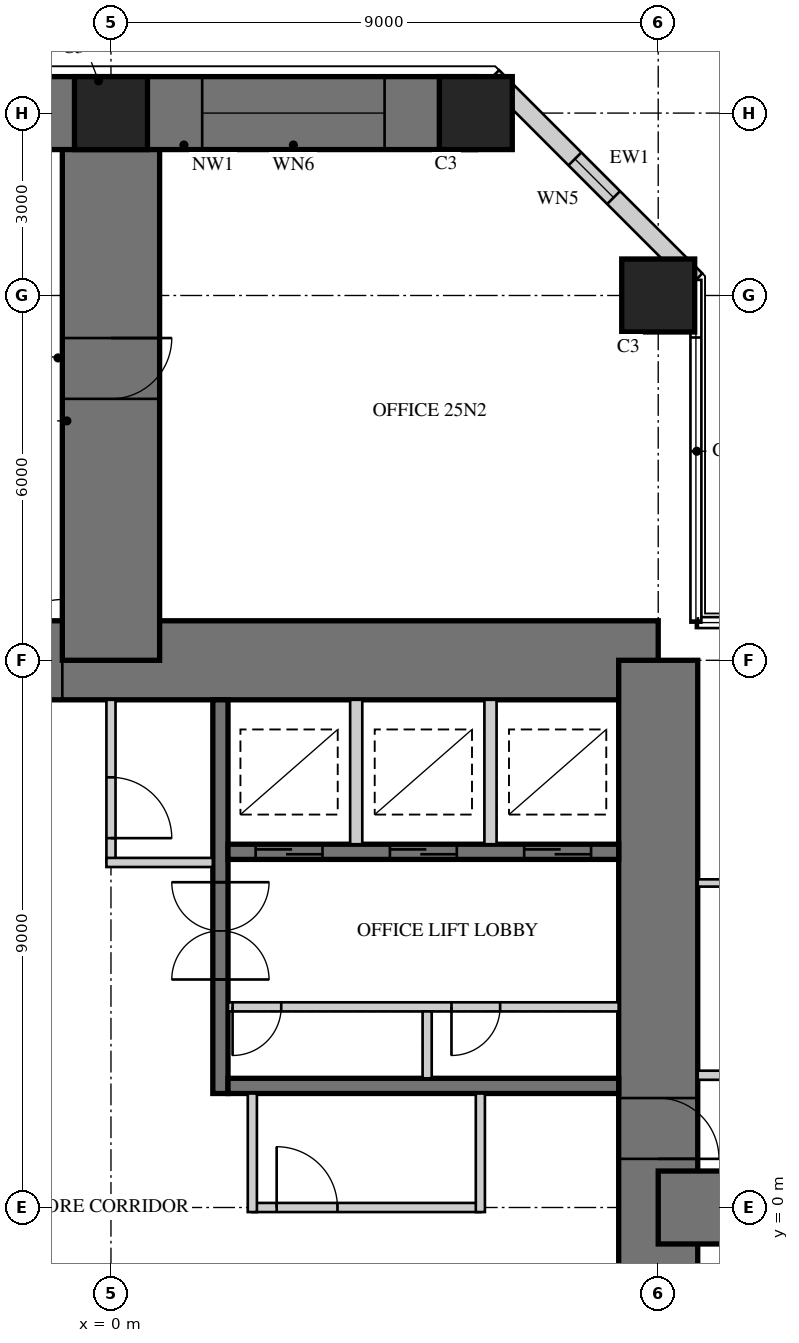
"""IFC4 building model, lengths in metres.
Left out: names, types, materials, properties, quantities, classifications, styles, units other than length and angle.
Written with IfcOpenShell. Run it as: python <this file> out.ifc"""

import sys

from ifc_helpers import new_model, si_unit, direction, frame, frame_2d, origin, origin_2d, place, context, subcontext, project, spatial, rectangle, hollow_rectangle, extrude, element, fill, save


model = new_model("IFC4")
c1 = context("Model", 3, precision=1e-05, world=origin(), true_north=direction((0.0, 1.0)))
c2 = subcontext(c1, "Body", "Model", "MODEL_VIEW")
j1 = project(units=[si_unit("LENGTHUNIT", "METRE"), si_unit("PLANEANGLEUNIT", "RADIAN")], contexts=[c1])
p1 = place(None, origin())
s1 = spatial("IfcSite", under=j1, at=p1, CompositionType="ELEMENT")
p2 = place(p1, origin())
s2 = spatial("IfcBuilding", under=s1, at=p2, CompositionType="ELEMENT")
p3 = place(p2, frame((0.0, 0.0, 104.5)))
s3 = spatial("IfcBuildingStorey", under=s2, at=p3, CompositionType="ELEMENT", Elevation=104.5)
p4 = place(p3, frame((9.0, 9.0, 0.0), z_axis=(0.0, 0.0, 1.0), x_axis=(-1.0, 0.0, 0.0)))
e1 = element("IfcWall", 1, at=p4, inside=s3, PredefinedType="SHEAR", context=c2, shape_type="SweptSolid", body=[
    extrude(rectangle(XDim=18.0, YDim=1.3, at=frame_2d((9.0, 0.0))), origin(), (0.0, 0.0, 1.0), 4.0),
])
p5 = place(p4, frame((9.8, 0.0, 0.0)))
e2 = element("IfcOpeningElement", 2, at=p5, cuts=e1, PredefinedType="OPENING", context=c2, shape_type="SweptSolid", body=[
    extrude(rectangle(XDim=1.0, YDim=2.4, at=frame_2d((0.5, 1.2))), frame((0.0, 0.66, 0.0), z_axis=(0.0, -1.0, 0.0), x_axis=(1.0, 0.0, 0.0)), (0.0, 0.0, 1.0), 1.32),
])
p6 = place(p3, frame((9.0, -9.0, 0.0), z_axis=(0.0, 0.0, 1.0), x_axis=(0.0, 1.0, 0.0)))
e3 = element("IfcWall", 3, at=p6, inside=s3, PredefinedType="SHEAR", context=c2, shape_type="SweptSolid", body=[
    extrude(rectangle(XDim=18.0, YDim=1.3, at=frame_2d((9.0, 0.0))), origin(), (0.0, 0.0, 1.0), 4.0),
])
p7 = place(p6, frame((9.8, 0.0, 0.0)))
e4 = element("IfcOpeningElement", 4, at=p7, cuts=e3, PredefinedType="OPENING", context=c2, shape_type="SweptSolid", body=[
    extrude(rectangle(XDim=1.0, YDim=2.4, at=frame_2d((0.5, 1.2))), frame((0.0, 0.66, 0.0), z_axis=(0.0, -1.0, 0.0), x_axis=(1.0, 0.0, 0.0)), (0.0, 0.0, 1.0), 1.32),
])
p8 = place(p3, frame((1.8, 1.875, 0.0), z_axis=(0.0, 0.0, 1.0), x_axis=(0.0, 1.0, 0.0)))
e5 = element("IfcWall", 5, at=p8, inside=s3, PredefinedType="SHEAR", context=c2, shape_type="SweptSolid", body=[
    extrude(rectangle(XDim=6.475, YDim=0.25, at=frame_2d((3.238, 0.0))), origin(), (0.0, 0.0, 1.0), 4.0),
])
p9 = place(p8, frame((1.875, 0.0, 0.0)))
e6 = element("IfcOpeningElement", 6, at=p9, cuts=e5, PredefinedType="OPENING", context=c2, shape_type="SweptSolid", body=[
    extrude(rectangle(XDim=1.6, YDim=2.4, at=frame_2d((0.8, 1.2))), frame((0.0, 0.135, 0.0), z_axis=(0.0, -1.0, 0.0), x_axis=(1.0, 0.0, 0.0)), (0.0, 0.0, 1.0), 0.27),
])
p10 = place(p3, frame((1.925, 2.0, 0.0), z_axis=(0.0, 0.0, 1.0), x_axis=(1.0, 0.0, 0.0)))
e7 = element("IfcWall", 7, at=p10, inside=s3, PredefinedType="SHEAR", context=c2, shape_type="SweptSolid", body=[
    extrude(rectangle(XDim=6.425, YDim=0.25, at=frame_2d((3.212, 0.0))), origin(), (0.0, 0.0, 1.0), 4.0),
])
p11 = place(p3, frame((1.925, 5.85, 0.0), z_axis=(0.0, 0.0, 1.0), x_axis=(1.0, 0.0, 0.0)))
e8 = element("IfcWall", 8, at=p11, inside=s3, PredefinedType="SHEAR", context=c2, shape_type="SweptSolid", body=[
    extrude(rectangle(XDim=6.425, YDim=0.25, at=frame_2d((3.212, 0.0))), origin(), (0.0, 0.0, 1.0), 4.0),
])
p12 = place(p11, frame((0.454, 0.0, 0.0)))
e9 = element("IfcOpeningElement", 9, at=p12, cuts=e8, PredefinedType="OPENING", context=c2, shape_type="SweptSolid", body=[
    extrude(rectangle(XDim=1.1, YDim=2.2, at=frame_2d((0.55, 1.1))), frame((0.0, 0.135, 0.0), z_axis=(0.0, -1.0, 0.0), x_axis=(1.0, 0.0, 0.0)), (0.0, 0.0, 1.0), 0.27),
])
p13 = place(p11, frame((2.663, 0.0, 0.0)))
e10 = element("IfcOpeningElement", 10, at=p13, cuts=e8, PredefinedType="OPENING", context=c2, shape_type="SweptSolid", body=[
    extrude(rectangle(XDim=1.1, YDim=2.2, at=frame_2d((0.55, 1.1))), frame((0.0, 0.135, 0.0), z_axis=(0.0, -1.0, 0.0), x_axis=(1.0, 0.0, 0.0)), (0.0, 0.0, 1.0), 0.27),
])
p14 = place(p11, frame((4.871, 0.0, 0.0)))
e11 = element("IfcOpeningElement", 11, at=p14, cuts=e8, PredefinedType="OPENING", context=c2, shape_type="SweptSolid", body=[
    extrude(rectangle(XDim=1.1, YDim=2.2, at=frame_2d((0.55, 1.1))), frame((0.0, 0.135, 0.0), z_axis=(0.0, -1.0, 0.0), x_axis=(1.0, 0.0, 0.0)), (0.0, 0.0, 1.0), 0.27),
])
p15 = place(p3, frame((1.925, 3.3, 0.0), z_axis=(0.0, 0.0, 1.0), x_axis=(1.0, 0.0, 0.0)))
e12 = element("IfcWall", 12, at=p15, inside=s3, PredefinedType="PARTITIONING", context=c2, shape_type="SweptSolid", body=[
    extrude(rectangle(XDim=6.425, YDim=0.15, at=frame_2d((3.212, 0.0))), origin(), (0.0, 0.0, 1.0), 4.0),
])
p16 = place(p15, frame((0.075, 0.0, 0.0)))
e13 = element("IfcOpeningElement", 13, at=p16, cuts=e12, PredefinedType="OPENING", context=c2, shape_type="SweptSolid", body=[
    extrude(rectangle(XDim=0.8, YDim=2.1, at=frame_2d((0.4, 1.05))), frame((0.0, 0.085, 0.0), z_axis=(0.0, -1.0, 0.0), x_axis=(1.0, 0.0, 0.0)), (0.0, 0.0, 1.0), 0.17),
])
p17 = place(p15, frame((3.675, 0.0, 0.0)))
e14 = element("IfcOpeningElement", 14, at=p17, cuts=e12, PredefinedType="OPENING", context=c2, shape_type="SweptSolid", body=[
    extrude(rectangle(XDim=0.8, YDim=2.1, at=frame_2d((0.4, 1.05))), frame((0.0, 0.085, 0.0), z_axis=(0.0, -1.0, 0.0), x_axis=(1.0, 0.0, 0.0)), (0.0, 0.0, 1.0), 0.17),
])
p18 = place(p3, frame((5.2, 2.125, 0.0), z_axis=(0.0, 0.0, 1.0), x_axis=(0.0, 1.0, 0.0)))
e15 = element("IfcWall", 15, at=p18, inside=s3, PredefinedType="PARTITIONING", context=c2, shape_type="SweptSolid", body=[
    extrude(rectangle(XDim=1.1, YDim=0.15, at=frame_2d((0.55, 0.0))), origin(), (0.0, 0.0, 1.0), 4.0),
])
for number, where, z_axis, x_axis in (
    (16, (4.033, 5.975, 0.0), (0.0, 0.0, 1.0), (0.0, 1.0, 0.0)),
    (17, (6.242, 5.975, 0.0), (0.0, 0.0, 1.0), (0.0, 1.0, 0.0)),
):
    element("IfcWall", number, at=place(p3, frame(where, z_axis=z_axis, x_axis=x_axis)), inside=s3, PredefinedType="PARTITIONING", context=c2, shape_type="SweptSolid", body=[
        extrude(rectangle(XDim=2.375, YDim=0.2, at=frame_2d((1.188, 0.0))), origin(), (0.0, 0.0, 1.0), 4.0),
    ])
p19 = place(p3, frame((0.0, 9.0, 0.0), z_axis=(0.0, 0.0, 1.0), x_axis=(0.0, 1.0, 0.0)))
e18 = element("IfcWall", 18, at=p19, inside=s3, PredefinedType="SHEAR", context=c2, shape_type="SweptSolid", body=[
    extrude(rectangle(XDim=9.0, YDim=1.6, at=frame_2d((4.5, 0.0))), origin(), (0.0, 0.0, 1.0), 4.0),
])
p20 = place(p19, frame((4.3, 0.0, 0.0)))
e19 = element("IfcOpeningElement", 19, at=p20, cuts=e18, PredefinedType="OPENING", context=c2, shape_type="SweptSolid", body=[
    extrude(rectangle(XDim=1.0, YDim=2.2, at=frame_2d((0.5, 1.1))), frame((0.0, 0.81, 0.0), z_axis=(0.0, -1.0, 0.0), x_axis=(1.0, 0.0, 0.0)), (0.0, 0.0, 1.0), 1.62),
])
p21 = place(p3, frame((6.0, 18.0, 0.0), z_axis=(0.0, 0.0, 1.0), x_axis=(-1.0, 0.0, 0.0)))
e20 = element("IfcWall", 20, at=p21, inside=s3, PredefinedType="SHEAR", context=c2, shape_type="SweptSolid", body=[
    extrude(rectangle(XDim=12.0, YDim=1.2, at=frame_2d((6.0, 0.0))), origin(), (0.0, 0.0, 1.0), 4.0),
])
p22 = place(p21, frame((1.5, 0.0, 0.6)))
e21 = element("IfcOpeningElement", 21, at=p22, cuts=e20, PredefinedType="OPENING", context=c2, shape_type="SweptSolid", body=[
    extrude(rectangle(XDim=3.0, YDim=2.4, at=frame_2d((1.5, 1.2))), frame((0.0, 0.61, 0.0), z_axis=(0.0, -1.0, 0.0), x_axis=(1.0, 0.0, 0.0)), (0.0, 0.0, 1.0), 1.22),
])
p23 = place(p21, frame((7.5, 0.0, 0.6)))
e22 = element("IfcOpeningElement", 22, at=p23, cuts=e20, PredefinedType="OPENING", context=c2, shape_type="SweptSolid", body=[
    extrude(rectangle(XDim=3.0, YDim=2.4, at=frame_2d((1.5, 1.2))), frame((0.0, 0.61, 0.0), z_axis=(0.0, -1.0, 0.0), x_axis=(1.0, 0.0, 0.0)), (0.0, 0.0, 1.0), 1.22),
])
p24 = place(p3, frame((9.0, 0.0, 0.0), z_axis=(0.0, 0.0, 1.0), x_axis=(1.0, 0.0, 0.0)))
e23 = element("IfcWall", 23, at=p24, inside=s3, PredefinedType="SHEAR", context=c2, shape_type="SweptSolid", body=[
    extrude(rectangle(XDim=18.0, YDim=1.2, at=frame_2d((9.0, 0.0))), origin(), (0.0, 0.0, 1.0), 4.0),
])
p25 = place(p24, frame((9.8, 0.0, 0.0)))
e24 = element("IfcOpeningElement", 24, at=p25, cuts=e23, PredefinedType="OPENING", context=c2, shape_type="SweptSolid", body=[
    extrude(rectangle(XDim=1.0, YDim=2.2, at=frame_2d((0.5, 1.1))), frame((0.0, 0.61, 0.0), z_axis=(0.0, -1.0, 0.0), x_axis=(1.0, 0.0, 0.0)), (0.0, 0.0, 1.0), 1.22),
])
for number, where, z_axis, x_axis in (
    (25, (9.0, 15.0, 0.0), (0.0, 0.0, 1.0), (1.0, 0.0, 0.0)),
    (26, (6.0, 18.0, 0.0), (0.0, 0.0, 1.0), (1.0, 0.0, 0.0)),
    (27, (0.0, 18.0, 0.0), (0.0, 0.0, 1.0), (1.0, 0.0, 0.0)),
):
    element("IfcColumn", number, at=place(p3, frame(where, z_axis=z_axis, x_axis=x_axis)), inside=s3, PredefinedType="COLUMN", context=c2, shape_type="SweptSolid", body=[
        extrude(rectangle(XDim=1.2, YDim=1.2, at=origin_2d()), origin(), (0.0, 0.0, 1.0), 4.0),
    ])
p26 = place(p3, frame((9.62, 15.257, 0.0), z_axis=(0.0, 0.0, 1.0), x_axis=(-0.707106781187, 0.707106781187, 0.0)))
e28 = element("IfcWall", 28, at=p26, inside=s3, PredefinedType="SOLIDWALL", context=c2, shape_type="SweptSolid", body=[
    extrude(rectangle(XDim=4.728, YDim=0.3, at=frame_2d((2.364, 0.0))), origin(), (0.0, 0.0, 1.0), 3.8),
])
p27 = place(p26, frame((1.914, 0.0, 0.3)))
e29 = element("IfcOpeningElement", 29, at=p27, cuts=e28, PredefinedType="OPENING", context=c2, shape_type="SweptSolid", body=[
    extrude(rectangle(XDim=0.9, YDim=2.4, at=frame_2d((0.45, 1.2))), frame((0.0, 0.16, 0.0), z_axis=(0.0, -1.0, 0.0), x_axis=(1.0, 0.0, 0.0)), (0.0, 0.0, 1.0), 0.32),
])
p28 = place(p3, frame((2.325, 0.0, 0.0), z_axis=(0.0, 0.0, 1.0), x_axis=(1.0, 0.0, 0.0)))
e30 = element("IfcWall", 30, at=p28, inside=s3, PredefinedType="PARTITIONING", context=c2, shape_type="SweptSolid", body=[
    extrude(rectangle(XDim=3.75, YDim=0.15, at=frame_2d((1.875, 0.0))), origin(), (0.0, 0.0, 1.0), 3.8),
])
p29 = place(p28, frame((0.4, 0.0, 0.0)))
e31 = element("IfcOpeningElement", 31, at=p29, cuts=e30, PredefinedType="OPENING", context=c2, shape_type="SweptSolid", body=[
    extrude(rectangle(XDim=1.0, YDim=2.1, at=frame_2d((0.5, 1.05))), frame((0.0, 0.085, 0.0), z_axis=(0.0, -1.0, 0.0), x_axis=(1.0, 0.0, 0.0)), (0.0, 0.0, 1.0), 0.17),
])
for number, where, z_axis, x_axis in (
    (32, (2.325, 1.875, 0.0), (0.0, 0.0, 1.0), (0.0, -1.0, 0.0)),
    (33, (6.075, -0.075, 0.0), (0.0, 0.0, 1.0), (0.0, 1.0, 0.0)),
):
    element("IfcWall", number, at=place(p3, frame(where, z_axis=z_axis, x_axis=x_axis)), inside=s3, PredefinedType="PARTITIONING", context=c2, shape_type="SweptSolid", body=[
        extrude(rectangle(XDim=1.95, YDim=0.15, at=frame_2d((0.975, 0.0))), origin(), (0.0, 0.0, 1.0), 3.8),
    ])
p30 = place(p3, frame((0.0, 5.675, 0.0), z_axis=(0.0, 0.0, 1.0), x_axis=(0.0, 1.0, 0.0)))
e34 = element("IfcWall", 34, at=p30, inside=s3, PredefinedType="PARTITIONING", context=c2, shape_type="SweptSolid", body=[
    extrude(rectangle(XDim=2.675, YDim=0.15, at=frame_2d((1.337, 0.0))), origin(), (0.0, 0.0, 1.0), 3.8),
])
p31 = place(p30, frame((0.4, 0.0, 0.0)))
e35 = element("IfcOpeningElement", 35, at=p31, cuts=e34, PredefinedType="OPENING", context=c2, shape_type="SweptSolid", body=[
    extrude(rectangle(XDim=1.0, YDim=2.1, at=frame_2d((0.5, 1.05))), frame((0.0, 0.085, 0.0), z_axis=(0.0, -1.0, 0.0), x_axis=(1.0, 0.0, 0.0)), (0.0, 0.0, 1.0), 0.17),
])
p32 = place(p3, frame((1.675, 5.675, 0.0), z_axis=(0.0, 0.0, 1.0), x_axis=(-1.0, 0.0, 0.0)))
e36 = element("IfcWall", 36, at=p32, inside=s3, PredefinedType="PARTITIONING", context=c2, shape_type="SweptSolid", body=[
    extrude(rectangle(XDim=1.75, YDim=0.15, at=frame_2d((0.875, 0.0))), origin(), (0.0, 0.0, 1.0), 3.8),
])
p33 = place(p3, frame((9.65, 2.175, 0.0), z_axis=(0.0, 0.0, 1.0), x_axis=(1.0, 0.0, 0.0)))
e37 = element("IfcWall", 37, at=p33, inside=s3, PredefinedType="PARTITIONING", context=c2, shape_type="SweptSolid", body=[
    extrude(rectangle(XDim=5.35, YDim=0.15, at=frame_2d((2.675, 0.0))), origin(), (0.0, 0.0, 1.0), 3.8),
])
p34 = place(p3, frame((9.65, 5.337, 0.0), z_axis=(0.0, 0.0, 1.0), x_axis=(1.0, 0.0, 0.0)))
e38 = element("IfcWall", 38, at=p34, inside=s3, PredefinedType="PLUMBINGWALL", context=c2, shape_type="SweptSolid", body=[
    extrude(rectangle(XDim=5.25, YDim=0.12, at=frame_2d((2.625, 0.0))), origin(), (0.0, 0.0, 1.0), 3.8),
])
p35 = place(p27, origin())
e39 = element("IfcWindow", 39, at=p35, inside=s3, PartitioningType="SINGLE_PANEL", PredefinedType="WINDOW", context=c2, shape_type="SweptSolid", body=[
    extrude(hollow_rectangle(XDim=0.9, YDim=2.4, WallThickness=0.06, at=frame_2d((0.45, 1.2))), frame((0.0, 0.03, 0.0), z_axis=(0.0, -1.0, 0.0), x_axis=(1.0, 0.0, 0.0)), (0.0, 0.0, 1.0), 0.06),
    extrude(rectangle(XDim=0.779, YDim=2.279, at=frame_2d((0.45, 1.2))), frame((0.0, 0.03, 0.0), z_axis=(0.0, -1.0, 0.0), x_axis=(1.0, 0.0, 0.0)), (0.0, 0.0, 1.0), 0.06),
])
fill(e29, e39)
p36 = place(p22, origin())
e40 = element("IfcWindow", 40, at=p36, inside=s3, PartitioningType="SINGLE_PANEL", PredefinedType="WINDOW", context=c2, shape_type="SweptSolid", body=[
    extrude(hollow_rectangle(XDim=3.0, YDim=2.4, WallThickness=0.06, at=frame_2d((1.5, 1.2))), frame((0.0, 0.03, 0.0), z_axis=(0.0, -1.0, 0.0), x_axis=(1.0, 0.0, 0.0)), (0.0, 0.0, 1.0), 0.06),
    extrude(rectangle(XDim=2.879, YDim=2.279, at=frame_2d((1.5, 1.2))), frame((0.0, 0.03, 0.0), z_axis=(0.0, -1.0, 0.0), x_axis=(1.0, 0.0, 0.0)), (0.0, 0.0, 1.0), 0.06),
])
fill(e21, e40)
p37 = place(p29, origin())
e41 = element("IfcDoor", 41, at=p37, inside=s3, OperationType="SINGLE_SWING_LEFT", PredefinedType="DOOR", context=c2, shape_type="SweptSolid", body=[
    extrude(rectangle(XDim=1.0, YDim=2.1, at=frame_2d((0.5, 1.05))), frame((0.0, 0.025, 0.0), z_axis=(0.0, -1.0, 0.0), x_axis=(1.0, 0.0, 0.0)), (0.0, 0.0, 1.0), 0.05),
])
fill(e31, e41)
p38 = place(p31, frame((1.0, 0.0, 0.0), z_axis=(0.0, 0.0, 1.0), x_axis=(-1.0, 0.0, 0.0)))
e42 = element("IfcDoor", 42, at=p38, inside=s3, OperationType="SINGLE_SWING_RIGHT", PredefinedType="DOOR", context=c2, shape_type="SweptSolid", body=[
    extrude(rectangle(XDim=1.0, YDim=2.1, at=frame_2d((0.5, 1.05))), frame((0.0, 0.025, 0.0), z_axis=(0.0, -1.0, 0.0), x_axis=(1.0, 0.0, 0.0)), (0.0, 0.0, 1.0), 0.05),
])
fill(e35, e42)
p39 = place(p20, frame((1.0, 0.0, 0.0), z_axis=(0.0, 0.0, 1.0), x_axis=(-1.0, 0.0, 0.0)))
e43 = element("IfcDoor", 43, at=p39, inside=s3, OperationType="SINGLE_SWING_LEFT", PredefinedType="DOOR", context=c2, shape_type="SweptSolid", body=[
    extrude(rectangle(XDim=1.0, YDim=2.2, at=frame_2d((0.5, 1.1))), frame((0.0, 0.025, 0.0), z_axis=(0.0, -1.0, 0.0), x_axis=(1.0, 0.0, 0.0)), (0.0, 0.0, 1.0), 0.05),
])
fill(e19, e43)
p40 = place(p5, frame((1.0, 0.0, 0.0), z_axis=(0.0, 0.0, 1.0), x_axis=(-1.0, 0.0, 0.0)))
e44 = element("IfcDoor", 44, at=p40, inside=s3, OperationType="SINGLE_SWING_RIGHT", PredefinedType="DOOR", context=c2, shape_type="SweptSolid", body=[
    extrude(rectangle(XDim=1.0, YDim=2.4, at=frame_2d((0.5, 1.2))), frame((0.0, -0.005, 0.0), z_axis=(0.0, -1.0, 0.0), x_axis=(1.0, 0.0, 0.0)), (0.0, 0.0, 1.0), 0.05),
])
fill(e2, e44)
p41 = place(p7, frame((1.0, 0.0, 0.0), z_axis=(0.0, 0.0, 1.0), x_axis=(-1.0, 0.0, 0.0)))
e45 = element("IfcDoor", 45, at=p41, inside=s3, OperationType="SINGLE_SWING_RIGHT", PredefinedType="DOOR", context=c2, shape_type="SweptSolid", body=[
    extrude(rectangle(XDim=1.0, YDim=2.4, at=frame_2d((0.5, 1.2))), frame((0.0, -0.005, 0.0), z_axis=(0.0, -1.0, 0.0), x_axis=(1.0, 0.0, 0.0)), (0.0, 0.0, 1.0), 0.05),
])
fill(e4, e45)
p42 = place(p12, origin())
e46 = element("IfcDoor", 46, at=p42, inside=s3, OperationType="DOUBLE_DOOR_SLIDING", PredefinedType="DOOR", context=c2, shape_type="SweptSolid", body=[
    extrude(rectangle(XDim=1.1, YDim=2.2, at=frame_2d((0.55, 1.1))), frame((0.0, 0.025, 0.0), z_axis=(0.0, -1.0, 0.0), x_axis=(1.0, 0.0, 0.0)), (0.0, 0.0, 1.0), 0.05),
])
fill(e9, e46)
p43 = place(p13, origin())
e47 = element("IfcDoor", 47, at=p43, inside=s3, OperationType="DOUBLE_DOOR_SLIDING", PredefinedType="DOOR", context=c2, shape_type="SweptSolid", body=[
    extrude(rectangle(XDim=1.1, YDim=2.2, at=frame_2d((0.55, 1.1))), frame((0.0, 0.025, 0.0), z_axis=(0.0, -1.0, 0.0), x_axis=(1.0, 0.0, 0.0)), (0.0, 0.0, 1.0), 0.05),
])
fill(e10, e47)
p44 = place(p14, origin())
e48 = element("IfcDoor", 48, at=p44, inside=s3, OperationType="DOUBLE_DOOR_SLIDING", PredefinedType="DOOR", context=c2, shape_type="SweptSolid", body=[
    extrude(rectangle(XDim=1.1, YDim=2.2, at=frame_2d((0.55, 1.1))), frame((0.0, 0.025, 0.0), z_axis=(0.0, -1.0, 0.0), x_axis=(1.0, 0.0, 0.0)), (0.0, 0.0, 1.0), 0.05),
])
fill(e11, e48)
p45 = place(p9, origin())
e49 = element("IfcDoor", 49, at=p45, inside=s3, OperationType="DOUBLE_DOOR_DOUBLE_SWING", PredefinedType="DOOR", context=c2, shape_type="SweptSolid", body=[
    extrude(rectangle(XDim=1.6, YDim=2.4, at=frame_2d((0.8, 1.2))), frame((0.0, 0.025, 0.0), z_axis=(0.0, -1.0, 0.0), x_axis=(1.0, 0.0, 0.0)), (0.0, 0.0, 1.0), 0.05),
])
fill(e6, e49)
p46 = place(p16, frame((0.8, 0.0, 0.0), z_axis=(0.0, 0.0, 1.0), x_axis=(-1.0, 0.0, 0.0)))
e50 = element("IfcDoor", 50, at=p46, inside=s3, OperationType="SINGLE_SWING_RIGHT", PredefinedType="DOOR", context=c2, shape_type="SweptSolid", body=[
    extrude(rectangle(XDim=0.8, YDim=2.1, at=frame_2d((0.4, 1.05))), frame((0.0, 0.025, 0.0), z_axis=(0.0, -1.0, 0.0), x_axis=(1.0, 0.0, 0.0)), (0.0, 0.0, 1.0), 0.05),
])
fill(e13, e50)
p47 = place(p17, frame((0.8, 0.0, 0.0), z_axis=(0.0, 0.0, 1.0), x_axis=(-1.0, 0.0, 0.0)))
e51 = element("IfcDoor", 51, at=p47, inside=s3, OperationType="SINGLE_SWING_RIGHT", PredefinedType="DOOR", context=c2, shape_type="SweptSolid", body=[
    extrude(rectangle(XDim=0.8, YDim=2.1, at=frame_2d((0.4, 1.05))), frame((0.0, 0.025, 0.0), z_axis=(0.0, -1.0, 0.0), x_axis=(1.0, 0.0, 0.0)), (0.0, 0.0, 1.0), 0.05),
])
fill(e14, e51)
save(model, sys.argv[1])
